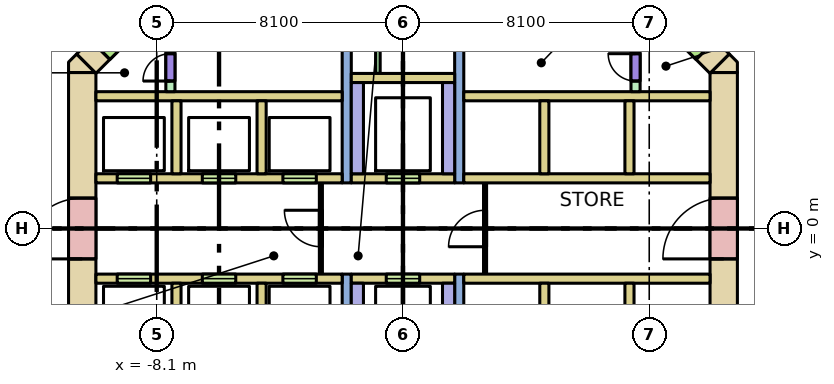
"""IFC4 building model, lengths in metres.
Left out: names, types, materials, properties, quantities, classifications, styles, units other than length and angle.
Written with IfcOpenShell. Run it as: python <this file> out.ifc"""

import sys

from ifc_helpers import new_model, si_unit, direction, frame, frame_2d, origin, place, context, subcontext, project, spatial, polyline, rectangle, outline, extrude, element, fill, save


model = new_model("IFC4")
c1 = context("Model", 3, precision=1e-05, world=origin(), true_north=direction((0.0, 1.0)))
c2 = subcontext(c1, "Body", "Model", "MODEL_VIEW")
j1 = project(units=[si_unit("LENGTHUNIT", "METRE"), si_unit("PLANEANGLEUNIT", "RADIAN")], contexts=[c1])
p1 = place(None, origin())
s1 = spatial("IfcSite", under=j1, at=p1, CompositionType="ELEMENT")
p2 = place(p1, origin())
s2 = spatial("IfcBuilding", under=s1, at=p2, CompositionType="ELEMENT")
p3 = place(p2, frame((0.0, 0.0, -10.8)))
s3 = spatial("IfcBuildingStorey", under=s2, at=p3, CompositionType="ELEMENT", Elevation=-10.8)
p4 = place(p3, frame((-10.55, -5.13, 0.0), z_axis=(0.0, 0.0, 1.0), x_axis=(0.0, 1.0, 0.0)))
e1 = element("IfcWall", 1, at=p4, inside=s3, PredefinedType="SHEAR", context=c2, shape_type="SweptSolid", body=[
    extrude(rectangle(XDim=10.26, YDim=0.9, at=frame_2d((5.13, 0.0))), origin(), (0.0, 0.0, 1.0), 3.28),
])
p5 = place(p4, frame((4.13, 0.0, 0.0)))
e2 = element("IfcOpeningElement", 2, at=p5, cuts=e1, PredefinedType="OPENING", context=c2, shape_type="SweptSolid", body=[
    extrude(rectangle(XDim=2.0, YDim=2.1, at=frame_2d((1.0, 1.05))), frame((0.0, 0.46, 0.0), z_axis=(0.0, -1.0, 0.0), x_axis=(1.0, 0.0, 0.0)), (0.0, 0.0, 1.0), 0.92),
])
p6 = place(p3, frame((10.55, -5.13, 0.0), z_axis=(0.0, 0.0, 1.0), x_axis=(0.0, 1.0, 0.0)))
e3 = element("IfcWall", 3, at=p6, inside=s3, PredefinedType="SHEAR", context=c2, shape_type="SweptSolid", body=[
    extrude(rectangle(XDim=10.26, YDim=0.9, at=frame_2d((5.13, 0.0))), origin(), (0.0, 0.0, 1.0), 3.28),
])
p7 = place(p6, frame((4.13, 0.0, 0.0)))
e4 = element("IfcOpeningElement", 4, at=p7, cuts=e3, PredefinedType="OPENING", context=c2, shape_type="SweptSolid", body=[
    extrude(rectangle(XDim=2.0, YDim=2.1, at=frame_2d((1.0, 1.05))), frame((0.0, 0.46, 0.0), z_axis=(0.0, -1.0, 0.0), x_axis=(1.0, 0.0, 0.0)), (0.0, 0.0, 1.0), 0.92),
])
p8 = place(p3, frame((-10.418, 5.418, 0.0), z_axis=(0.0, 0.0, 1.0), x_axis=(0.707106781187, 0.707106781187, 0.0)))
e5 = element("IfcWall", 5, at=p8, inside=s3, PredefinedType="SHEAR", context=c2, shape_type="SweptSolid", body=[
    extrude(rectangle(XDim=4.243, YDim=0.9, at=frame_2d((2.121, 0.0))), origin(), (0.0, 0.0, 1.0), 3.28),
])
p9 = place(p8, frame((0.65, 0.0, 0.0)))
e6 = element("IfcOpeningElement", 6, at=p9, cuts=e5, PredefinedType="OPENING", context=c2, shape_type="SweptSolid", body=[
    extrude(rectangle(XDim=1.2, YDim=2.1, at=frame_2d((0.6, 1.05))), frame((0.0, 0.46, 0.0), z_axis=(0.0, -1.0, 0.0), x_axis=(1.0, 0.0, 0.0)), (0.0, 0.0, 1.0), 0.92),
])
p10 = place(p3, frame((7.418, 8.418, 0.0), z_axis=(0.0, 0.0, 1.0), x_axis=(0.707106781187, -0.707106781187, 0.0)))
e7 = element("IfcWall", 7, at=p10, inside=s3, PredefinedType="SHEAR", context=c2, shape_type="SweptSolid", body=[
    extrude(rectangle(XDim=4.243, YDim=0.9, at=frame_2d((2.121, 0.0))), origin(), (0.0, 0.0, 1.0), 3.28),
])
p11 = place(p10, frame((2.393, 0.0, 0.0)))
e8 = element("IfcOpeningElement", 8, at=p11, cuts=e7, PredefinedType="OPENING", context=c2, shape_type="SweptSolid", body=[
    extrude(rectangle(XDim=1.2, YDim=2.1, at=frame_2d((0.6, 1.05))), frame((0.0, 0.46, 0.0), z_axis=(0.0, -1.0, 0.0), x_axis=(1.0, 0.0, 0.0)), (0.0, 0.0, 1.0), 0.92),
])
p12 = place(p3, origin())
e9 = element("IfcWall", 9, at=p12, inside=s3, PredefinedType="SHEAR", context=c2, shape_type="SweptSolid", body=[
    extrude(outline(polyline([(-10.736, 5.736), (-10.13, 5.13), (-11.0, 5.13), (-11.0, 5.473), (-10.736, 5.736)])), origin(), (0.0, 0.0, 1.0), 3.28),
])
p13 = place(p3, origin())
e10 = element("IfcWall", 10, at=p13, inside=s3, PredefinedType="SHEAR", context=c2, shape_type="SweptSolid", body=[
    extrude(outline(polyline([(11.0, 5.473), (11.0, 5.13), (10.13, 5.13), (10.736, 5.736), (11.0, 5.473)])), origin(), (0.0, 0.0, 1.0), 3.28),
])
for number, where, z_axis, x_axis in (
    (11, (-10.1, 4.35, 0.0), (0.0, 0.0, 1.0), (1.0, 0.0, 0.0)),
    (12, (2.0, 4.35, 0.0), (0.0, 0.0, 1.0), (1.0, 0.0, 0.0)),
):
    element("IfcWall", number, at=place(p3, frame(where, z_axis=z_axis, x_axis=x_axis)), inside=s3, PredefinedType="SOLIDWALL", context=c2, shape_type="SweptSolid", body=[
        extrude(rectangle(XDim=8.1, YDim=0.3, at=frame_2d((4.05, 0.0))), origin(), (0.0, 0.0, 1.0), 3.28),
    ])
p14 = place(p3, frame((-10.1, 1.65, 0.0), z_axis=(0.0, 0.0, 1.0), x_axis=(1.0, 0.0, 0.0)))
e13 = element("IfcWall", 13, at=p14, inside=s3, PredefinedType="SOLIDWALL", context=c2, shape_type="SweptSolid", body=[
    extrude(rectangle(XDim=8.1, YDim=0.3, at=frame_2d((4.05, 0.0))), origin(), (0.0, 0.0, 1.0), 3.28),
])
p15 = place(p14, frame((0.7, 0.0, 0.0)))
e14 = element("IfcOpeningElement", 14, at=p15, cuts=e13, PredefinedType="OPENING", context=c2, shape_type="SweptSolid", body=[
    extrude(rectangle(XDim=1.1, YDim=2.1, at=frame_2d((0.55, 1.05))), frame((0.0, 0.16, 0.0), z_axis=(0.0, -1.0, 0.0), x_axis=(1.0, 0.0, 0.0)), (0.0, 0.0, 1.0), 0.32),
])
p16 = place(p14, frame((3.5, 0.0, 0.0)))
e15 = element("IfcOpeningElement", 15, at=p16, cuts=e13, PredefinedType="OPENING", context=c2, shape_type="SweptSolid", body=[
    extrude(rectangle(XDim=1.1, YDim=2.1, at=frame_2d((0.55, 1.05))), frame((0.0, 0.16, 0.0), z_axis=(0.0, -1.0, 0.0), x_axis=(1.0, 0.0, 0.0)), (0.0, 0.0, 1.0), 0.32),
])
p17 = place(p14, frame((6.15, 0.0, 0.0)))
e16 = element("IfcOpeningElement", 16, at=p17, cuts=e13, PredefinedType="OPENING", context=c2, shape_type="SweptSolid", body=[
    extrude(rectangle(XDim=1.1, YDim=2.1, at=frame_2d((0.55, 1.05))), frame((0.0, 0.16, 0.0), z_axis=(0.0, -1.0, 0.0), x_axis=(1.0, 0.0, 0.0)), (0.0, 0.0, 1.0), 0.32),
])
p18 = place(p3, frame((-10.1, -1.65, 0.0), z_axis=(0.0, 0.0, 1.0), x_axis=(1.0, 0.0, 0.0)))
e17 = element("IfcWall", 17, at=p18, inside=s3, PredefinedType="SOLIDWALL", context=c2, shape_type="SweptSolid", body=[
    extrude(rectangle(XDim=8.1, YDim=0.3, at=frame_2d((4.05, 0.0))), origin(), (0.0, 0.0, 1.0), 3.28),
])
p19 = place(p18, frame((0.7, 0.0, 0.0)))
e18 = element("IfcOpeningElement", 18, at=p19, cuts=e17, PredefinedType="OPENING", context=c2, shape_type="SweptSolid", body=[
    extrude(rectangle(XDim=1.1, YDim=2.1, at=frame_2d((0.55, 1.05))), frame((0.0, 0.16, 0.0), z_axis=(0.0, -1.0, 0.0), x_axis=(1.0, 0.0, 0.0)), (0.0, 0.0, 1.0), 0.32),
])
p20 = place(p18, frame((3.5, 0.0, 0.0)))
e19 = element("IfcOpeningElement", 19, at=p20, cuts=e17, PredefinedType="OPENING", context=c2, shape_type="SweptSolid", body=[
    extrude(rectangle(XDim=1.1, YDim=2.1, at=frame_2d((0.55, 1.05))), frame((0.0, 0.16, 0.0), z_axis=(0.0, -1.0, 0.0), x_axis=(1.0, 0.0, 0.0)), (0.0, 0.0, 1.0), 0.32),
])
p21 = place(p18, frame((6.15, 0.0, 0.0)))
e20 = element("IfcOpeningElement", 20, at=p21, cuts=e17, PredefinedType="OPENING", context=c2, shape_type="SweptSolid", body=[
    extrude(rectangle(XDim=1.1, YDim=2.1, at=frame_2d((0.55, 1.05))), frame((0.0, 0.16, 0.0), z_axis=(0.0, -1.0, 0.0), x_axis=(1.0, 0.0, 0.0)), (0.0, 0.0, 1.0), 0.32),
])
for number, where, z_axis, x_axis in (
    (21, (2.0, 1.65, 0.0), (0.0, 0.0, 1.0), (1.0, 0.0, 0.0)),
    (22, (2.0, -1.65, 0.0), (0.0, 0.0, 1.0), (1.0, 0.0, 0.0)),
):
    element("IfcWall", number, at=place(p3, frame(where, z_axis=z_axis, x_axis=x_axis)), inside=s3, PredefinedType="SOLIDWALL", context=c2, shape_type="SweptSolid", body=[
        extrude(rectangle(XDim=8.1, YDim=0.3, at=frame_2d((4.05, 0.0))), origin(), (0.0, 0.0, 1.0), 3.28),
    ])
for number, where, z_axis, x_axis in (
    (23, (-7.45, 1.8, 0.0), (0.0, 0.0, 1.0), (0.0, 1.0, 0.0)),
    (24, (-7.45, -4.2, 0.0), (0.0, 0.0, 1.0), (0.0, 1.0, 0.0)),
    (25, (-4.65, 1.8, 0.0), (0.0, 0.0, 1.0), (0.0, 1.0, 0.0)),
    (26, (-4.65, -4.2, 0.0), (0.0, 0.0, 1.0), (0.0, 1.0, 0.0)),
    (27, (4.65, 1.8, 0.0), (0.0, 0.0, 1.0), (0.0, 1.0, 0.0)),
    (28, (4.65, -4.2, 0.0), (0.0, 0.0, 1.0), (0.0, 1.0, 0.0)),
    (29, (7.45, 1.8, 0.0), (0.0, 0.0, 1.0), (0.0, 1.0, 0.0)),
    (30, (7.45, -4.2, 0.0), (0.0, 0.0, 1.0), (0.0, 1.0, 0.0)),
):
    element("IfcWall", number, at=place(p3, frame(where, z_axis=z_axis, x_axis=x_axis)), inside=s3, PredefinedType="SOLIDWALL", context=c2, shape_type="SweptSolid", body=[
        extrude(rectangle(XDim=2.4, YDim=0.3, at=frame_2d((1.2, 0.0))), origin(), (0.0, 0.0, 1.0), 3.28),
    ])
for number, where, z_axis, x_axis in (
    (31, (-1.85, 1.5, 0.0), (0.0, 0.0, 1.0), (0.0, 1.0, 0.0)),
    (32, (-1.85, -8.1, 0.0), (0.0, 0.0, 1.0), (0.0, 1.0, 0.0)),
    (33, (1.85, 1.5, 0.0), (0.0, 0.0, 1.0), (0.0, 1.0, 0.0)),
    (34, (1.85, -8.1, 0.0), (0.0, 0.0, 1.0), (0.0, 1.0, 0.0)),
):
    element("IfcWall", number, at=place(p3, frame(where, z_axis=z_axis, x_axis=x_axis)), inside=s3, PredefinedType="SHEAR", context=c2, shape_type="SweptSolid", body=[
        extrude(rectangle(XDim=6.6, YDim=0.3, at=frame_2d((3.3, 0.0))), origin(), (0.0, 0.0, 1.0), 3.28),
    ])
p22 = place(p3, frame((-1.7, 1.65, 0.0), z_axis=(0.0, 0.0, 1.0), x_axis=(1.0, 0.0, 0.0)))
e35 = element("IfcWall", 35, at=p22, inside=s3, PredefinedType="SOLIDWALL", context=c2, shape_type="SweptSolid", body=[
    extrude(rectangle(XDim=3.4, YDim=0.3, at=frame_2d((1.7, 0.0))), origin(), (0.0, 0.0, 1.0), 3.28),
])
p23 = place(p22, frame((1.15, 0.0, 0.0)))
e36 = element("IfcOpeningElement", 36, at=p23, cuts=e35, PredefinedType="OPENING", context=c2, shape_type="SweptSolid", body=[
    extrude(rectangle(XDim=1.1, YDim=2.1, at=frame_2d((0.55, 1.05))), frame((0.0, 0.16, 0.0), z_axis=(0.0, -1.0, 0.0), x_axis=(1.0, 0.0, 0.0)), (0.0, 0.0, 1.0), 0.32),
])
p24 = place(p3, frame((-1.7, -1.65, 0.0), z_axis=(0.0, 0.0, 1.0), x_axis=(1.0, 0.0, 0.0)))
e37 = element("IfcWall", 37, at=p24, inside=s3, PredefinedType="SOLIDWALL", context=c2, shape_type="SweptSolid", body=[
    extrude(rectangle(XDim=3.4, YDim=0.3, at=frame_2d((1.7, 0.0))), origin(), (0.0, 0.0, 1.0), 3.28),
])
p25 = place(p24, frame((1.15, 0.0, 0.0)))
e38 = element("IfcOpeningElement", 38, at=p25, cuts=e37, PredefinedType="OPENING", context=c2, shape_type="SweptSolid", body=[
    extrude(rectangle(XDim=1.1, YDim=2.1, at=frame_2d((0.55, 1.05))), frame((0.0, 0.16, 0.0), z_axis=(0.0, -1.0, 0.0), x_axis=(1.0, 0.0, 0.0)), (0.0, 0.0, 1.0), 0.32),
])
for number, where, z_axis, x_axis in (
    (39, (-1.5, 1.8, 0.0), (0.0, 0.0, 1.0), (0.0, 1.0, 0.0)),
    (40, (-1.5, -4.8, 0.0), (0.0, 0.0, 1.0), (0.0, 1.0, 0.0)),
    (41, (1.5, 1.8, 0.0), (0.0, 0.0, 1.0), (0.0, 1.0, 0.0)),
    (42, (1.5, -4.8, 0.0), (0.0, 0.0, 1.0), (0.0, 1.0, 0.0)),
):
    element("IfcWall", number, at=place(p3, frame(where, z_axis=z_axis, x_axis=x_axis)), inside=s3, PredefinedType="SOLIDWALL", context=c2, shape_type="SweptSolid", body=[
        extrude(rectangle(XDim=3.0, YDim=0.4, at=frame_2d((1.5, 0.0))), origin(), (0.0, 0.0, 1.0), 3.28),
    ])
p26 = place(p3, frame((-1.7, 4.95, 0.0), z_axis=(0.0, 0.0, 1.0), x_axis=(1.0, 0.0, 0.0)))
e43 = element("IfcWall", 43, at=p26, inside=s3, PredefinedType="SOLIDWALL", context=c2, shape_type="SweptSolid", body=[
    extrude(rectangle(XDim=3.4, YDim=0.3, at=frame_2d((1.7, 0.0))), origin(), (0.0, 0.0, 1.0), 3.28),
])
p27 = place(p3, frame((-7.65, 4.5, 0.0), z_axis=(0.0, 0.0, 1.0), x_axis=(0.0, 1.0, 0.0)))
e44 = element("IfcWall", 44, at=p27, inside=s3, PredefinedType="SHEAR", context=c2, shape_type="SweptSolid", body=[
    extrude(rectangle(XDim=3.14, YDim=0.3, at=frame_2d((1.57, 0.0))), origin(), (0.0, 0.0, 1.0), 3.28),
])
p28 = place(p27, frame((0.35, 0.0, 0.0)))
e45 = element("IfcOpeningElement", 45, at=p28, cuts=e44, PredefinedType="OPENING", context=c2, shape_type="SweptSolid", body=[
    extrude(rectangle(XDim=0.9, YDim=2.1, at=frame_2d((0.45, 1.05))), frame((0.0, 0.16, 0.0), z_axis=(0.0, -1.0, 0.0), x_axis=(1.0, 0.0, 0.0)), (0.0, 0.0, 1.0), 0.32),
])
p29 = place(p3, frame((7.65, 4.5, 0.0), z_axis=(0.0, 0.0, 1.0), x_axis=(0.0, 1.0, 0.0)))
e46 = element("IfcWall", 46, at=p29, inside=s3, PredefinedType="SHEAR", context=c2, shape_type="SweptSolid", body=[
    extrude(rectangle(XDim=3.14, YDim=0.3, at=frame_2d((1.57, 0.0))), origin(), (0.0, 0.0, 1.0), 3.28),
])
p30 = place(p29, frame((0.35, 0.0, 0.0)))
e47 = element("IfcOpeningElement", 47, at=p30, cuts=e46, PredefinedType="OPENING", context=c2, shape_type="SweptSolid", body=[
    extrude(rectangle(XDim=0.9, YDim=2.1, at=frame_2d((0.45, 1.05))), frame((0.0, 0.16, 0.0), z_axis=(0.0, -1.0, 0.0), x_axis=(1.0, 0.0, 0.0)), (0.0, 0.0, 1.0), 0.32),
])
p31 = place(p3, frame((-2.7, -1.5, 0.0), z_axis=(0.0, 0.0, 1.0), x_axis=(0.0, 1.0, 0.0)))
e48 = element("IfcWall", 48, at=p31, inside=s3, PredefinedType="PARTITIONING", context=c2, shape_type="SweptSolid", body=[
    extrude(rectangle(XDim=3.0, YDim=0.1, at=frame_2d((1.5, 0.0))), origin(), (0.0, 0.0, 1.0), 3.28),
])
p32 = place(p31, frame((0.9, 0.0, 0.0)))
e49 = element("IfcOpeningElement", 49, at=p32, cuts=e48, PredefinedType="OPENING", context=c2, shape_type="SweptSolid", body=[
    extrude(rectangle(XDim=1.2, YDim=2.1, at=frame_2d((0.6, 1.05))), frame((0.0, 0.06, 0.0), z_axis=(0.0, -1.0, 0.0), x_axis=(1.0, 0.0, 0.0)), (0.0, 0.0, 1.0), 0.12),
])
p33 = place(p3, frame((2.7, -1.5, 0.0), z_axis=(0.0, 0.0, 1.0), x_axis=(0.0, 1.0, 0.0)))
e50 = element("IfcWall", 50, at=p33, inside=s3, PredefinedType="PARTITIONING", context=c2, shape_type="SweptSolid", body=[
    extrude(rectangle(XDim=3.0, YDim=0.1, at=frame_2d((1.5, 0.0))), origin(), (0.0, 0.0, 1.0), 3.28),
])
p34 = place(p33, frame((0.9, 0.0, 0.0)))
e51 = element("IfcOpeningElement", 51, at=p34, cuts=e50, PredefinedType="OPENING", context=c2, shape_type="SweptSolid", body=[
    extrude(rectangle(XDim=1.2, YDim=2.1, at=frame_2d((0.6, 1.05))), frame((0.0, 0.06, 0.0), z_axis=(0.0, -1.0, 0.0), x_axis=(1.0, 0.0, 0.0)), (0.0, 0.0, 1.0), 0.12),
])
p35 = place(p3, frame((-0.825, 5.1, 0.0), z_axis=(0.0, 0.0, 1.0), x_axis=(0.0, 1.0, 0.0)))
e52 = element("IfcWall", 52, at=p35, inside=s3, PredefinedType="PARTITIONING", context=c2, shape_type="SweptSolid", body=[
    extrude(rectangle(XDim=3.0, YDim=0.15, at=frame_2d((1.5, 0.0))), origin(), (0.0, 0.0, 1.0), 3.28),
])
p36 = place(p15, origin())
e53 = element("IfcDoor", 53, at=p36, inside=s3, OperationType="DOUBLE_DOOR_SLIDING", PredefinedType="DOOR", context=c2, shape_type="SweptSolid", body=[
    extrude(rectangle(XDim=1.1, YDim=2.1, at=frame_2d((0.55, 1.05))), frame((0.0, 0.025, 0.0), z_axis=(0.0, -1.0, 0.0), x_axis=(1.0, 0.0, 0.0)), (0.0, 0.0, 1.0), 0.05),
])
fill(e14, e53)
p37 = place(p16, origin())
e54 = element("IfcDoor", 54, at=p37, inside=s3, OperationType="DOUBLE_DOOR_SLIDING", PredefinedType="DOOR", context=c2, shape_type="SweptSolid", body=[
    extrude(rectangle(XDim=1.1, YDim=2.1, at=frame_2d((0.55, 1.05))), frame((0.0, 0.025, 0.0), z_axis=(0.0, -1.0, 0.0), x_axis=(1.0, 0.0, 0.0)), (0.0, 0.0, 1.0), 0.05),
])
fill(e15, e54)
p38 = place(p17, origin())
e55 = element("IfcDoor", 55, at=p38, inside=s3, OperationType="DOUBLE_DOOR_SLIDING", PredefinedType="DOOR", context=c2, shape_type="SweptSolid", body=[
    extrude(rectangle(XDim=1.1, YDim=2.1, at=frame_2d((0.55, 1.05))), frame((0.0, 0.025, 0.0), z_axis=(0.0, -1.0, 0.0), x_axis=(1.0, 0.0, 0.0)), (0.0, 0.0, 1.0), 0.05),
])
fill(e16, e55)
p39 = place(p19, origin())
e56 = element("IfcDoor", 56, at=p39, inside=s3, OperationType="DOUBLE_DOOR_SLIDING", PredefinedType="DOOR", context=c2, shape_type="SweptSolid", body=[
    extrude(rectangle(XDim=1.1, YDim=2.1, at=frame_2d((0.55, 1.05))), frame((0.0, 0.025, 0.0), z_axis=(0.0, -1.0, 0.0), x_axis=(1.0, 0.0, 0.0)), (0.0, 0.0, 1.0), 0.05),
])
fill(e18, e56)
p40 = place(p20, origin())
e57 = element("IfcDoor", 57, at=p40, inside=s3, OperationType="DOUBLE_DOOR_SLIDING", PredefinedType="DOOR", context=c2, shape_type="SweptSolid", body=[
    extrude(rectangle(XDim=1.1, YDim=2.1, at=frame_2d((0.55, 1.05))), frame((0.0, 0.025, 0.0), z_axis=(0.0, -1.0, 0.0), x_axis=(1.0, 0.0, 0.0)), (0.0, 0.0, 1.0), 0.05),
])
fill(e19, e57)
p41 = place(p21, origin())
e58 = element("IfcDoor", 58, at=p41, inside=s3, OperationType="DOUBLE_DOOR_SLIDING", PredefinedType="DOOR", context=c2, shape_type="SweptSolid", body=[
    extrude(rectangle(XDim=1.1, YDim=2.1, at=frame_2d((0.55, 1.05))), frame((0.0, 0.025, 0.0), z_axis=(0.0, -1.0, 0.0), x_axis=(1.0, 0.0, 0.0)), (0.0, 0.0, 1.0), 0.05),
])
fill(e20, e58)
p42 = place(p23, origin())
e59 = element("IfcDoor", 59, at=p42, inside=s3, OperationType="DOUBLE_DOOR_SLIDING", PredefinedType="DOOR", context=c2, shape_type="SweptSolid", body=[
    extrude(rectangle(XDim=1.1, YDim=2.1, at=frame_2d((0.55, 1.05))), frame((0.0, 0.025, 0.0), z_axis=(0.0, -1.0, 0.0), x_axis=(1.0, 0.0, 0.0)), (0.0, 0.0, 1.0), 0.05),
])
fill(e36, e59)
p43 = place(p25, origin())
e60 = element("IfcDoor", 60, at=p43, inside=s3, OperationType="DOUBLE_DOOR_SLIDING", PredefinedType="DOOR", context=c2, shape_type="SweptSolid", body=[
    extrude(rectangle(XDim=1.1, YDim=2.1, at=frame_2d((0.55, 1.05))), frame((0.0, 0.025, 0.0), z_axis=(0.0, -1.0, 0.0), x_axis=(1.0, 0.0, 0.0)), (0.0, 0.0, 1.0), 0.05),
])
fill(e38, e60)
p44 = place(p28, origin())
e61 = element("IfcDoor", 61, at=p44, inside=s3, OperationType="SINGLE_SWING_LEFT", PredefinedType="DOOR", context=c2, shape_type="SweptSolid", body=[
    extrude(rectangle(XDim=0.9, YDim=2.1, at=frame_2d((0.45, 1.05))), frame((0.0, 0.025, 0.0), z_axis=(0.0, -1.0, 0.0), x_axis=(1.0, 0.0, 0.0)), (0.0, 0.0, 1.0), 0.05),
])
fill(e45, e61)
p45 = place(p30, origin())
e62 = element("IfcDoor", 62, at=p45, inside=s3, OperationType="SINGLE_SWING_RIGHT", PredefinedType="DOOR", context=c2, shape_type="SweptSolid", body=[
    extrude(rectangle(XDim=0.9, YDim=2.1, at=frame_2d((0.45, 1.05))), frame((0.0, 0.025, 0.0), z_axis=(0.0, -1.0, 0.0), x_axis=(1.0, 0.0, 0.0)), (0.0, 0.0, 1.0), 0.05),
])
fill(e47, e62)
p46 = place(p5, origin())
e63 = element("IfcDoor", 63, at=p46, inside=s3, OperationType="DOUBLE_DOOR_SINGLE_SWING", PredefinedType="DOOR", context=c2, shape_type="SweptSolid", body=[
    extrude(rectangle(XDim=2.0, YDim=2.1, at=frame_2d((1.0, 1.05))), frame((0.0, 0.025, 0.0), z_axis=(0.0, -1.0, 0.0), x_axis=(1.0, 0.0, 0.0)), (0.0, 0.0, 1.0), 0.05),
])
fill(e2, e63)
p47 = place(p7, origin())
e64 = element("IfcDoor", 64, at=p47, inside=s3, OperationType="DOUBLE_DOOR_SINGLE_SWING", PredefinedType="DOOR", context=c2, shape_type="SweptSolid", body=[
    extrude(rectangle(XDim=2.0, YDim=2.1, at=frame_2d((1.0, 1.05))), frame((0.0, 0.025, 0.0), z_axis=(0.0, -1.0, 0.0), x_axis=(1.0, 0.0, 0.0)), (0.0, 0.0, 1.0), 0.05),
])
fill(e4, e64)
p48 = place(p32, origin())
e65 = element("IfcDoor", 65, at=p48, inside=s3, OperationType="SINGLE_SWING_RIGHT", PredefinedType="DOOR", context=c2, shape_type="SweptSolid", body=[
    extrude(rectangle(XDim=1.2, YDim=2.1, at=frame_2d((0.6, 1.05))), frame((0.0, 0.025, 0.0), z_axis=(0.0, -1.0, 0.0), x_axis=(1.0, 0.0, 0.0)), (0.0, 0.0, 1.0), 0.05),
])
fill(e49, e65)
p49 = place(p34, origin())
e66 = element("IfcDoor", 66, at=p49, inside=s3, OperationType="SINGLE_SWING_LEFT", PredefinedType="DOOR", context=c2, shape_type="SweptSolid", body=[
    extrude(rectangle(XDim=1.2, YDim=2.1, at=frame_2d((0.6, 1.05))), frame((0.0, 0.025, 0.0), z_axis=(0.0, -1.0, 0.0), x_axis=(1.0, 0.0, 0.0)), (0.0, 0.0, 1.0), 0.05),
])
fill(e51, e66)
save(model, sys.argv[1])
